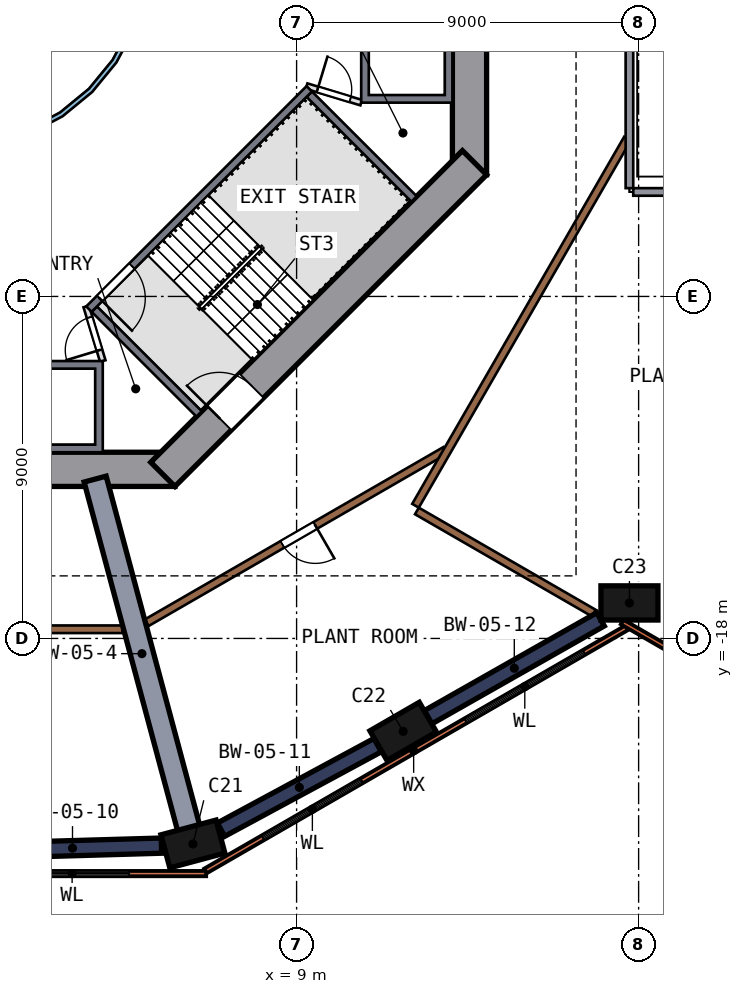
"""IFC4 building model, lengths in metres.
Left out: names, types, materials, properties, quantities, classifications, styles, units other than length and angle.
Written with IfcOpenShell. Run it as: python <this file> out.ifc"""

import sys

from ifc_helpers import new_model, si_unit, direction, frame, frame_2d, origin, origin_2d, place, context, subcontext, project, spatial, polyline, rectangle, outline, extrude, element, fill, save


model = new_model("IFC4")
c1 = context("Model", 3, precision=1e-05, world=origin(), true_north=direction((0.0, 1.0)))
c2 = subcontext(c1, "Body", "Model", "MODEL_VIEW")
j1 = project(units=[si_unit("LENGTHUNIT", "METRE"), si_unit("PLANEANGLEUNIT", "RADIAN")], contexts=[c1])
p1 = place(None, origin())
s1 = spatial("IfcSite", under=j1, at=p1, CompositionType="ELEMENT")
p2 = place(p1, origin())
s2 = spatial("IfcBuilding", under=s1, at=p2, CompositionType="ELEMENT")
p3 = place(p2, frame((0.0, 0.0, 28.0)))
s3 = spatial("IfcBuildingStorey", under=s2, at=p3, CompositionType="ELEMENT", Elevation=28.0)
p4 = place(p3, frame((6.278, -23.428, 0.0), z_axis=(-0.004448124, 0.016653341, 0.999851429), x_axis=(-0.966130395, -0.258054373, 0.0)))
e1 = element("IfcColumn", 1, at=p4, inside=s3, PredefinedType="COLUMN", context=c2, shape_type="SweptSolid", body=[
    extrude(rectangle(XDim=1.5, YDim=0.9, at=origin_2d()), origin(), (0.0, 0.0, 1.0), 4.501),
])
for number, where, z_axis, x_axis in (
    (2, (11.804, -20.445, 0.0), (0.0, 0.0, 1.0), (0.866, 0.5, 0.0)),
    (3, (17.758, -17.065, 0.0), (0.0, 0.0, 1.0), (-1.0, 0.0, 0.0)),
):
    element("IfcColumn", number, at=place(p3, frame(where, z_axis=z_axis, x_axis=x_axis)), inside=s3, PredefinedType="COLUMN", context=c2, shape_type="SweptSolid", body=[
        extrude(rectangle(XDim=1.5, YDim=0.9, at=origin_2d()), origin(), (0.0, 0.0, 1.0), 4.5),
    ])
p5 = place(p3, frame((13.55, -5.799, 0.0), z_axis=(0.0, 0.0, 1.0), x_axis=(0.0, 1.0, 0.0)))
e4 = element("IfcWall", 4, at=p5, inside=s3, PredefinedType="SHEAR", context=c2, shape_type="SweptSolid", body=[
    extrude(rectangle(XDim=11.598, YDim=0.9, at=frame_2d((5.799, 0.0))), origin(), (0.0, 0.0, 1.0), 6.0),
])
p6 = place(p5, frame((4.899, 0.0, 0.0)))
e5 = element("IfcOpeningElement", 5, at=p6, cuts=e4, PredefinedType="OPENING", context=c2, shape_type="SweptSolid", body=[
    extrude(rectangle(XDim=1.8, YDim=2.1, at=frame_2d((0.9, 1.05))), frame((0.0, 0.46, 0.0), z_axis=(0.0, -1.0, 0.0), x_axis=(1.0, 0.0, 0.0)), (0.0, 0.0, 1.0), 0.92),
])
p7 = place(p3, frame((-5.799, -13.55, 0.0), z_axis=(0.0, 0.0, 1.0), x_axis=(1.0, 0.0, 0.0)))
e6 = element("IfcWall", 6, at=p7, inside=s3, PredefinedType="SHEAR", context=c2, shape_type="SweptSolid", body=[
    extrude(rectangle(XDim=11.598, YDim=0.9, at=frame_2d((5.799, 0.0))), origin(), (0.0, 0.0, 1.0), 6.0),
])
p8 = place(p7, frame((4.899, 0.0, 0.0)))
e7 = element("IfcOpeningElement", 7, at=p8, cuts=e6, PredefinedType="OPENING", context=c2, shape_type="SweptSolid", body=[
    extrude(rectangle(XDim=1.8, YDim=2.1, at=frame_2d((0.9, 1.05))), frame((0.0, 0.46, 0.0), z_axis=(0.0, -1.0, 0.0), x_axis=(1.0, 0.0, 0.0)), (0.0, 0.0, 1.0), 0.92),
])
p9 = place(p3, frame((5.481, -13.682, 0.0), z_axis=(0.0, 0.0, 1.0), x_axis=(0.707106781, 0.707106781, 0.0)))
e8 = element("IfcWall", 8, at=p9, inside=s3, PredefinedType="SHEAR", context=c2, shape_type="SweptSolid", body=[
    extrude(rectangle(XDim=11.598, YDim=0.9, at=frame_2d((5.799, 0.0))), origin(), (0.0, 0.0, 1.0), 6.0),
])
p10 = place(p9, frame((2.099, 0.0, 0.0)))
e9 = element("IfcOpeningElement", 9, at=p10, cuts=e8, PredefinedType="OPENING", context=c2, shape_type="SweptSolid", body=[
    extrude(rectangle(XDim=1.2, YDim=2.1, at=frame_2d((0.6, 1.05))), frame((0.0, 0.46, 0.0), z_axis=(0.0, -1.0, 0.0), x_axis=(1.0, 0.0, 0.0)), (0.0, 0.0, 1.0), 0.92),
])
p11 = place(p3, frame((0.762, -23.586, 0.0), z_axis=(0.0, 0.0, 1.0), x_axis=(0.99958902, 0.028666908, 0.0)))
e10 = element("IfcWall", 10, at=p11, inside=s3, PredefinedType="SHEAR", context=c2, shape_type="SweptSolid", body=[
    extrude(rectangle(XDim=4.684, YDim=0.4, at=frame_2d((2.342, 0.0))), origin(), (0.0, 0.0, 1.0), 4.5),
])
p12 = place(p3, frame((7.011, -23.032, 0.0), z_axis=(0.0, 0.0, 1.0), x_axis=(0.879988629, 0.474994751, 0.0)))
e11 = element("IfcWall", 11, at=p12, inside=s3, PredefinedType="SHEAR", context=c2, shape_type="SweptSolid", body=[
    extrude(rectangle(XDim=4.684, YDim=0.4, at=frame_2d((2.342, 0.0))), origin(), (0.0, 0.0, 1.0), 4.5),
])
p13 = place(p3, frame((12.459, -20.073, 0.0), z_axis=(0.0, 0.0, 1.0), x_axis=(0.869667461, 0.493638034, 0.0)))
e12 = element("IfcWall", 12, at=p13, inside=s3, PredefinedType="SHEAR", context=c2, shape_type="SweptSolid", body=[
    extrude(rectangle(XDim=5.219, YDim=0.4, at=frame_2d((2.609, 0.0))), origin(), (0.0, 0.0, 1.0), 4.5),
])
p14 = place(p3, frame((3.699, -13.807, 0.0), z_axis=(0.0, 0.0, 1.0), x_axis=(0.258827184, -0.965923645, 0.0)))
e13 = element("IfcWall", 13, at=p14, inside=s3, PredefinedType="SHEAR", context=c2, shape_type="SweptSolid", body=[
    extrude(rectangle(XDim=9.511, YDim=0.6, at=frame_2d((4.755, 0.0))), origin(), (0.0, 0.0, 1.0), 4.5),
])
p15 = place(p3, frame((-6.341, -24.188, 0.0), z_axis=(0.0, 0.0, 1.0), x_axis=(1.0, 0.0, 0.0)))
e14 = element("IfcWall", 14, at=p15, inside=s3, PredefinedType="SOLIDWALL", context=c2, shape_type="SweptSolid", body=[
    extrude(rectangle(XDim=12.962, YDim=0.14, at=frame_2d((6.481, 0.0))), origin(), (0.0, 0.0, 1.0), 4.5),
])
p16 = place(p15, frame((1.748, 0.0, 0.9)))
e15 = element("IfcOpeningElement", 15, at=p16, cuts=e14, PredefinedType="OPENING", context=c2, shape_type="SweptSolid", body=[
    extrude(rectangle(XDim=3.0, YDim=3.3, at=frame_2d((1.5, 1.65))), frame((0.0, 0.08, 0.0), z_axis=(0.0, -1.0, 0.0), x_axis=(1.0, 0.0, 0.0)), (0.0, 0.0, 1.0), 0.16),
])
p17 = place(p15, frame((7.935, 0.0, 0.9)))
e16 = element("IfcOpeningElement", 16, at=p17, cuts=e14, PredefinedType="OPENING", context=c2, shape_type="SweptSolid", body=[
    extrude(rectangle(XDim=3.0, YDim=3.3, at=frame_2d((1.5, 1.65))), frame((0.0, 0.08, 0.0), z_axis=(0.0, -1.0, 0.0), x_axis=(1.0, 0.0, 0.0)), (0.0, 0.0, 1.0), 0.16),
])
p18 = place(p3, frame((6.603, -24.118, 0.0), z_axis=(0.0, 0.0, 1.0), x_axis=(0.866023287, 0.500003667, 0.0)))
e17 = element("IfcWall", 17, at=p18, inside=s3, PredefinedType="SOLIDWALL", context=c2, shape_type="SweptSolid", body=[
    extrude(rectangle(XDim=12.801, YDim=0.14, at=frame_2d((6.4, 0.0))), origin(), (0.0, 0.0, 1.0), 4.5),
])
p19 = place(p18, frame((1.748, 0.0, 0.9)))
e18 = element("IfcOpeningElement", 18, at=p19, cuts=e17, PredefinedType="OPENING", context=c2, shape_type="SweptSolid", body=[
    extrude(rectangle(XDim=3.0, YDim=3.3, at=frame_2d((1.5, 1.65))), frame((0.0, 0.08, 0.0), z_axis=(0.0, -1.0, 0.0), x_axis=(1.0, 0.0, 0.0)), (0.0, 0.0, 1.0), 0.16),
])
p20 = place(p18, frame((7.902, 0.0, 0.9)))
e19 = element("IfcOpeningElement", 19, at=p20, cuts=e17, PredefinedType="OPENING", context=c2, shape_type="SweptSolid", body=[
    extrude(rectangle(XDim=3.6, YDim=3.3, at=frame_2d((1.8, 1.65))), frame((0.0, 0.08, 0.0), z_axis=(0.0, -1.0, 0.0), x_axis=(1.0, 0.0, 0.0)), (0.0, 0.0, 1.0), 0.16),
])
p21 = place(p3, frame((17.565, -17.566, 0.0), z_axis=(0.0, 0.0, 1.0), x_axis=(0.866028022, -0.499995465, 0.0)))
e20 = element("IfcWall", 20, at=p21, inside=s3, PredefinedType="SOLIDWALL", context=c2, shape_type="SweptSolid", body=[
    extrude(rectangle(XDim=11.405, YDim=0.14, at=frame_2d((5.702, 0.0))), origin(), (0.0, 0.0, 1.0), 4.5),
])
p22 = place(p21, frame((1.623, 0.0, 0.9)))
e21 = element("IfcOpeningElement", 21, at=p22, cuts=e20, PredefinedType="OPENING", context=c2, shape_type="SweptSolid", body=[
    extrude(rectangle(XDim=3.6, YDim=3.3, at=frame_2d((1.8, 1.65))), frame((0.0, 0.08, 0.0), z_axis=(0.0, -1.0, 0.0), x_axis=(1.0, 0.0, 0.0)), (0.0, 0.0, 1.0), 0.16),
])
p23 = place(p3, origin())
e22 = element("IfcWall", 22, at=p23, inside=s3, PredefinedType="SOLIDWALL", context=c2, shape_type="SweptSolid", body=[
    extrude(outline(polyline([(13.1, -1.2), (13.1, -3.9), (10.7, -3.9), (10.7, -1.2), (13.1, -1.2)]), holes=[polyline([(10.9, -3.7), (12.9, -3.7), (12.9, -1.4), (10.9, -1.4), (10.9, -3.7)])]), origin(), (0.0, 0.0, 1.0), 5.55),
])
p24 = place(p3, origin())
e23 = element("IfcWall", 23, at=p24, inside=s3, PredefinedType="SOLIDWALL", context=c2, shape_type="SweptSolid", body=[
    extrude(outline(polyline([(3.9, -10.7), (3.9, -13.1), (1.2, -13.1), (1.2, -10.7), (3.9, -10.7)]), holes=[polyline([(1.4, -12.9), (3.7, -12.9), (3.7, -10.9), (1.4, -10.9), (1.4, -12.9)])]), origin(), (0.0, 0.0, 1.0), 5.55),
])
p25 = place(p3, frame((9.334, -3.535, 0.0), z_axis=(0.0, 0.0, 1.0), x_axis=(-0.707106781, -0.707106781, 0.0)))
e24 = element("IfcWall", 24, at=p25, inside=s3, PredefinedType="SOLIDWALL", context=c2, shape_type="SweptSolid", body=[
    extrude(rectangle(XDim=8.2, YDim=0.2, at=frame_2d((4.1, 0.0))), origin(), (0.0, 0.0, 1.0), 5.55),
])
p26 = place(p25, frame((6.6, 0.0, 0.0)))
e25 = element("IfcOpeningElement", 25, at=p26, cuts=e24, PredefinedType="OPENING", context=c2, shape_type="SweptSolid", body=[
    extrude(rectangle(XDim=1.2, YDim=2.1, at=frame_2d((0.6, 1.05))), frame((0.0, 0.11, 0.0), z_axis=(0.0, -1.0, 0.0), x_axis=(1.0, 0.0, 0.0)), (0.0, 0.0, 1.0), 0.22),
])
for number, where, z_axis, x_axis in (
    (26, (3.677, -9.334, 0.0), (0.0, 0.0, 1.0), (0.707, -0.707, 0.0)),
    (27, (9.334, -3.677, 0.0), (0.0, 0.0, 1.0), (0.707, -0.707, 0.0)),
):
    element("IfcWall", number, at=place(p3, frame(where, z_axis=z_axis, x_axis=x_axis)), inside=s3, PredefinedType="SOLIDWALL", context=c2, shape_type="SweptSolid", body=[
        extrude(rectangle(XDim=3.9, YDim=0.2, at=frame_2d((1.95, 0.0))), origin(), (0.0, 0.0, 1.0), 5.55),
    ])
p27 = place(p3, frame((3.9, -10.7, 0.0), z_axis=(0.0, 0.0, 1.0), x_axis=(-0.289808785, 0.957084567, 0.0)))
e28 = element("IfcWall", 28, at=p27, inside=s3, PredefinedType="PARTITIONING", context=c2, shape_type="SweptSolid", body=[
    extrude(rectangle(XDim=1.501, YDim=0.15, at=frame_2d((0.75, 0.0))), origin(), (0.0, 0.0, 1.0), 5.55),
])
p28 = place(p27, frame((0.301, 0.0, 0.0)))
e29 = element("IfcOpeningElement", 29, at=p28, cuts=e28, PredefinedType="OPENING", context=c2, shape_type="SweptSolid", body=[
    extrude(rectangle(XDim=0.9, YDim=2.1, at=frame_2d((0.45, 1.05))), frame((0.0, 0.085, 0.0), z_axis=(0.0, -1.0, 0.0), x_axis=(1.0, 0.0, 0.0)), (0.0, 0.0, 1.0), 0.17),
])
p29 = place(p3, frame((9.263, -3.465, 0.0), z_axis=(0.0, 0.0, 1.0), x_axis=(0.957084567, -0.289808785, 0.0)))
e30 = element("IfcWall", 30, at=p29, inside=s3, PredefinedType="PARTITIONING", context=c2, shape_type="SweptSolid", body=[
    extrude(rectangle(XDim=1.501, YDim=0.15, at=frame_2d((0.75, 0.0))), origin(), (0.0, 0.0, 1.0), 5.55),
])
p30 = place(p29, frame((0.301, 0.0, 0.0)))
e31 = element("IfcOpeningElement", 31, at=p30, cuts=e30, PredefinedType="OPENING", context=c2, shape_type="SweptSolid", body=[
    extrude(rectangle(XDim=0.9, YDim=2.1, at=frame_2d((0.45, 1.05))), frame((0.0, 0.085, 0.0), z_axis=(0.0, -1.0, 0.0), x_axis=(1.0, 0.0, 0.0)), (0.0, 0.0, 1.0), 0.17),
])
p31 = place(p3, origin())
e32 = element("IfcWall", 32, at=p31, inside=s3, PredefinedType="SOLIDWALL", context=c2, shape_type="SweptSolid", body=[
    extrude(outline(polyline([(5.021, -0.999), (4.73, -1.959), (4.257, -2.844), (3.62, -3.62), (2.844, -4.257), (1.959, -4.73), (0.999, -5.021), (0.0, -5.12), (-0.999, -5.021), (-1.959, -4.73), (-2.844, -4.257), (-3.62, -3.62), (-4.257, -2.844), (-4.73, -1.959), (-5.021, -0.999), (-5.12, 0.0), (-5.021, 0.999), (-4.73, 1.959), (-4.257, 2.844), (-3.62, 3.62), (-2.844, 4.257), (-1.959, 4.73), (-0.999, 5.021), (0.0, 5.12), (0.999, 5.021), (1.959, 4.73), (2.844, 4.257), (3.62, 3.62), (4.257, 2.844), (4.73, 1.959), (5.021, 0.999), (5.12, 0.0), (5.021, -0.999)]), holes=[polyline([(4.904, 0.976), (4.619, 1.913), (4.157, 2.778), (3.535, 3.535), (2.778, 4.157), (1.913, 4.619), (0.976, 4.904), (0.0, 5.0), (-0.976, 4.904), (-1.913, 4.619), (-2.778, 4.157), (-3.535, 3.535), (-4.157, 2.778), (-4.619, 1.913), (-4.904, 0.976), (-5.0, 0.0), (-4.904, -0.976), (-4.619, -1.913), (-4.157, -2.778), (-3.535, -3.535), (-2.778, -4.157), (-1.913, -4.619), (-0.976, -4.904), (0.0, -5.0), (0.976, -4.904), (1.913, -4.619), (2.778, -4.157), (3.535, -3.535), (4.157, -2.778), (4.619, -1.913), (4.904, -0.976), (5.0, 0.0), (4.904, 0.976)])]), origin(), (0.0, 0.0, 1.0), 5.55),
])
p32 = place(p3, frame((4.417, -17.758, 0.0), z_axis=(0.0, 0.0, 1.0), x_axis=(-1.0, 0.0, 0.0)))
e33 = element("IfcWall", 33, at=p32, inside=s3, PredefinedType="SOLIDWALL", context=c2, shape_type="SweptSolid", body=[
    extrude(rectangle(XDim=8.833, YDim=0.2, at=frame_2d((4.417, 0.0))), origin(), (0.0, 0.0, 1.0), 4.5),
])
p33 = place(p32, frame((3.75, 0.0, 0.0)))
e34 = element("IfcOpeningElement", 34, at=p33, cuts=e33, PredefinedType="OPENING", context=c2, shape_type="SweptSolid", body=[
    extrude(rectangle(XDim=1.0, YDim=2.1, at=frame_2d((0.5, 1.05))), frame((0.0, 0.11, 0.0), z_axis=(0.0, -1.0, 0.0), x_axis=(1.0, 0.0, 0.0)), (0.0, 0.0, 1.0), 0.22),
])
p34 = place(p3, frame((12.166, -14.645, 0.0), z_axis=(0.0, 0.0, 1.0), x_axis=(0.866004064, -0.50003696, 0.0)))
e35 = element("IfcWall", 35, at=p34, inside=s3, PredefinedType="SOLIDWALL", context=c2, shape_type="SweptSolid", body=[
    extrude(rectangle(XDim=5.375, YDim=0.2, at=frame_2d((2.688, 0.0))), origin(), (0.0, 0.0, 1.0), 4.5),
])
p35 = place(p3, frame((12.913, -13.05, 0.0), z_axis=(0.0, 0.0, 1.0), x_axis=(-0.866031025, -0.499990264, 0.0)))
e36 = element("IfcWall", 36, at=p35, inside=s3, PredefinedType="SOLIDWALL", context=c2, shape_type="SweptSolid", body=[
    extrude(rectangle(XDim=9.075, YDim=0.2, at=frame_2d((4.538, 0.0))), origin(), (0.0, 0.0, 1.0), 4.5),
])
p36 = place(p35, frame((3.95, 0.0, 0.0)))
e37 = element("IfcOpeningElement", 37, at=p36, cuts=e36, PredefinedType="OPENING", context=c2, shape_type="SweptSolid", body=[
    extrude(rectangle(XDim=1.0, YDim=2.1, at=frame_2d((0.5, 1.05))), frame((0.0, 0.11, 0.0), z_axis=(0.0, -1.0, 0.0), x_axis=(1.0, 0.0, 0.0)), (0.0, 0.0, 1.0), 0.22),
])
p37 = place(p3, frame((17.858, -6.25, 0.0), z_axis=(0.0, 0.0, 1.0), x_axis=(1.0, 0.0, 0.0)))
e38 = element("IfcWall", 38, at=p37, inside=s3, PredefinedType="SOLIDWALL", context=c2, shape_type="SweptSolid", body=[
    extrude(rectangle(XDim=4.6, YDim=0.2, at=frame_2d((2.3, 0.0))), origin(), (0.0, 0.0, 1.0), 4.5),
])
p38 = place(p3, frame((17.708, -4.845, 0.0), z_axis=(0.0, 0.0, 1.0), x_axis=(-0.499998343, -0.866026361, 0.0)))
e39 = element("IfcWall", 39, at=p38, inside=s3, PredefinedType="SOLIDWALL", context=c2, shape_type="SweptSolid", body=[
    extrude(rectangle(XDim=11.158, YDim=0.2, at=frame_2d((5.579, 0.0))), origin(), (0.0, 0.0, 1.0), 4.5),
])
p39 = place(p3, frame((17.758, 3.15, 0.0), z_axis=(0.0, 0.0, 1.0), x_axis=(0.0, -1.0, 0.0)))
e40 = element("IfcWall", 40, at=p39, inside=s3, PredefinedType="SOLIDWALL", context=c2, shape_type="SweptSolid", body=[
    extrude(rectangle(XDim=9.3, YDim=0.2, at=frame_2d((4.65, 0.0))), origin(), (0.0, 0.0, 1.0), 4.5),
])
p40 = place(p17, origin())
e41 = element("IfcWindow", 41, at=p40, inside=s3, PartitioningType="SINGLE_PANEL", PredefinedType="WINDOW", context=c2, shape_type="SweptSolid", body=[
    extrude(rectangle(XDim=3.0, YDim=3.3, at=frame_2d((1.5, 1.65))), frame((0.0, 0.03, 0.0), z_axis=(0.0, -1.0, 0.0), x_axis=(1.0, 0.0, 0.0)), (0.0, 0.0, 1.0), 0.06),
])
fill(e16, e41)
p41 = place(p19, origin())
e42 = element("IfcWindow", 42, at=p41, inside=s3, PartitioningType="SINGLE_PANEL", PredefinedType="WINDOW", context=c2, shape_type="SweptSolid", body=[
    extrude(rectangle(XDim=3.0, YDim=3.3, at=frame_2d((1.5, 1.65))), frame((0.0, 0.03, 0.0), z_axis=(0.0, -1.0, 0.0), x_axis=(1.0, 0.0, 0.0)), (0.0, 0.0, 1.0), 0.06),
])
fill(e18, e42)
p42 = place(p20, origin())
e43 = element("IfcWindow", 43, at=p42, inside=s3, PartitioningType="SINGLE_PANEL", PredefinedType="WINDOW", context=c2, shape_type="SweptSolid", body=[
    extrude(rectangle(XDim=3.6, YDim=3.3, at=frame_2d((1.8, 1.65))), frame((0.0, 0.03, 0.0), z_axis=(0.0, -1.0, 0.0), x_axis=(1.0, 0.0, 0.0)), (0.0, 0.0, 1.0), 0.06),
])
fill(e19, e43)
p43 = place(p26, origin())
e44 = element("IfcDoor", 44, at=p43, inside=s3, OperationType="SINGLE_SWING_RIGHT", PredefinedType="DOOR", context=c2, shape_type="SweptSolid", body=[
    extrude(rectangle(XDim=1.2, YDim=2.1, at=frame_2d((0.6, 1.05))), frame((0.0, 0.025, 0.0), z_axis=(0.0, -1.0, 0.0), x_axis=(1.0, 0.0, 0.0)), (0.0, 0.0, 1.0), 0.05),
])
fill(e25, e44)
p44 = place(p10, origin())
e45 = element("IfcDoor", 45, at=p44, inside=s3, OperationType="SINGLE_SWING_LEFT", PredefinedType="DOOR", context=c2, shape_type="SweptSolid", body=[
    extrude(rectangle(XDim=1.2, YDim=2.1, at=frame_2d((0.6, 1.05))), frame((0.0, 0.025, 0.0), z_axis=(0.0, -1.0, 0.0), x_axis=(1.0, 0.0, 0.0)), (0.0, 0.0, 1.0), 0.05),
])
fill(e9, e45)
p45 = place(p28, origin())
e46 = element("IfcDoor", 46, at=p45, inside=s3, OperationType="SINGLE_SWING_LEFT", PredefinedType="DOOR", context=c2, shape_type="SweptSolid", body=[
    extrude(rectangle(XDim=0.9, YDim=2.1, at=frame_2d((0.45, 1.05))), frame((0.0, 0.025, 0.0), z_axis=(0.0, -1.0, 0.0), x_axis=(1.0, 0.0, 0.0)), (0.0, 0.0, 1.0), 0.05),
])
fill(e29, e46)
p46 = place(p30, origin())
e47 = element("IfcDoor", 47, at=p46, inside=s3, OperationType="SINGLE_SWING_LEFT", PredefinedType="DOOR", context=c2, shape_type="SweptSolid", body=[
    extrude(rectangle(XDim=0.9, YDim=2.1, at=frame_2d((0.45, 1.05))), frame((0.0, 0.025, 0.0), z_axis=(0.0, -1.0, 0.0), x_axis=(1.0, 0.0, 0.0)), (0.0, 0.0, 1.0), 0.05),
])
fill(e31, e47)
p47 = place(p36, origin())
e48 = element("IfcDoor", 48, at=p47, inside=s3, OperationType="SINGLE_SWING_LEFT", PredefinedType="DOOR", context=c2, shape_type="SweptSolid", body=[
    extrude(rectangle(XDim=1.0, YDim=2.1, at=frame_2d((0.5, 1.05))), frame((0.0, 0.025, 0.0), z_axis=(0.0, -1.0, 0.0), x_axis=(1.0, 0.0, 0.0)), (0.0, 0.0, 1.0), 0.05),
])
fill(e37, e48)
save(model, sys.argv[1])
